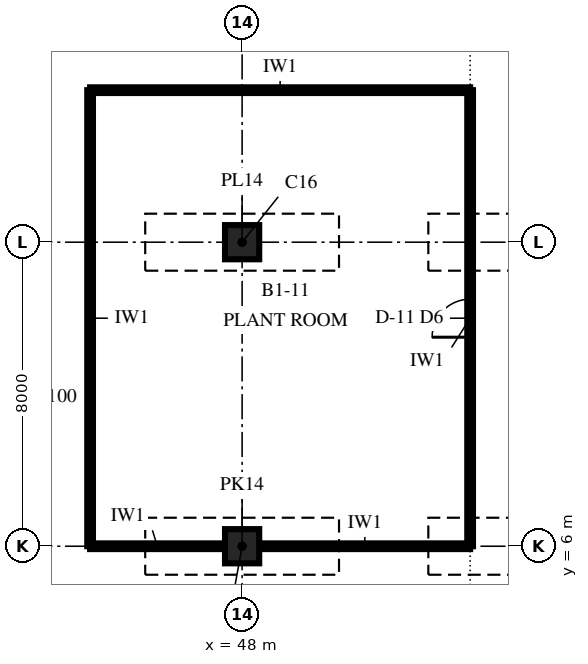
"""IFC4 building model, lengths in metres.
Left out: names, types, materials, properties, quantities, classifications, styles, units other than length and angle.
Written with IfcOpenShell. Run it as: python <this file> out.ifc"""

import sys

from ifc_helpers import new_model, si_unit, direction, frame, frame_2d, origin, origin_2d, place, context, subcontext, project, spatial, rectangle, extrude, element, fill, save


model = new_model("IFC4")
c1 = context("Model", 3, precision=1e-05, world=origin(), true_north=direction((0.0, 1.0)))
c2 = subcontext(c1, "Body", "Model", "MODEL_VIEW")
j1 = project(units=[si_unit("LENGTHUNIT", "METRE"), si_unit("PLANEANGLEUNIT", "RADIAN")], contexts=[c1])
p1 = place(None, origin())
s1 = spatial("IfcSite", under=j1, at=p1, CompositionType="ELEMENT")
p2 = place(p1, origin())
s2 = spatial("IfcBuilding", under=s1, at=p2, CompositionType="ELEMENT")
p3 = place(p2, frame((0.0, 0.0, -7.0)))
s3 = spatial("IfcBuildingStorey", under=s2, at=p3, CompositionType="ELEMENT", Elevation=-7.0)
for number, where, z_axis, x_axis in (
    (1, (48.0, 6.0, -0.6), (0.0, 0.0, 1.0), (1.0, 0.0, 0.0)),
    (2, (48.0, 14.0, -0.6), (0.0, 0.0, 1.0), (1.0, 0.0, 0.0)),
):
    element("IfcColumn", number, at=place(p3, frame(where, z_axis=z_axis, x_axis=x_axis)), inside=s3, PredefinedType="COLUMN", context=c2, shape_type="SweptSolid", body=[
        extrude(rectangle(XDim=0.9, YDim=0.9, at=origin_2d()), origin(), (0.0, 0.0, 1.0), 7.6),
    ])
p4 = place(p3, frame((44.0, 6.0, 0.0), z_axis=(0.0, 0.0, 1.0), x_axis=(0.0, 1.0, 0.0)))
e3 = element("IfcWall", 3, at=p4, inside=s3, PredefinedType="PARTITIONING", context=c2, shape_type="SweptSolid", body=[
    extrude(rectangle(XDim=12.0, YDim=0.15, at=frame_2d((6.0, 0.0))), origin(), (0.0, 0.0, 1.0), 6.7),
])
p5 = place(p3, frame((54.0, 6.0, 0.0), z_axis=(0.0, 0.0, 1.0), x_axis=(0.0, 1.0, 0.0)))
e4 = element("IfcWall", 4, at=p5, inside=s3, PredefinedType="PARTITIONING", context=c2, shape_type="SweptSolid", body=[
    extrude(rectangle(XDim=12.0, YDim=0.15, at=frame_2d((6.0, 0.0))), origin(), (0.0, 0.0, 1.0), 6.7),
])
p6 = place(p5, frame((5.5, 0.0, 0.0)))
e5 = element("IfcOpeningElement", 5, at=p6, cuts=e4, PredefinedType="OPENING", context=c2, shape_type="SweptSolid", body=[
    extrude(rectangle(XDim=1.0, YDim=2.1, at=frame_2d((0.5, 1.05))), frame((0.0, 0.09, 0.0), z_axis=(0.0, -1.0, 0.0), x_axis=(1.0, 0.0, 0.0)), (0.0, 0.0, 1.0), 0.18),
])
p7 = place(p3, frame((44.0, 6.0, 0.0), z_axis=(0.0, 0.0, 1.0), x_axis=(1.0, 0.0, 0.0)))
e6 = element("IfcWall", 6, at=p7, inside=s3, PredefinedType="PARTITIONING", context=c2, shape_type="SweptSolid", body=[
    extrude(rectangle(XDim=3.54, YDim=0.15, at=frame_2d((1.77, 0.0))), origin(), (0.0, 0.0, 1.0), 6.05),
])
p8 = place(p3, frame((48.46, 6.0, 0.0), z_axis=(0.0, 0.0, 1.0), x_axis=(1.0, 0.0, 0.0)))
e7 = element("IfcWall", 7, at=p8, inside=s3, PredefinedType="PARTITIONING", context=c2, shape_type="SweptSolid", body=[
    extrude(rectangle(XDim=5.54, YDim=0.15, at=frame_2d((2.77, 0.0))), origin(), (0.0, 0.0, 1.0), 6.05),
])
p9 = place(p3, frame((44.0, 18.0, 0.0), z_axis=(0.0, 0.0, 1.0), x_axis=(1.0, 0.0, 0.0)))
e8 = element("IfcWall", 8, at=p9, inside=s3, PredefinedType="PARTITIONING", context=c2, shape_type="SweptSolid", body=[
    extrude(rectangle(XDim=10.0, YDim=0.15, at=frame_2d((5.0, 0.0))), origin(), (0.0, 0.0, 1.0), 6.7),
])
p10 = place(p6, origin())
e9 = element("IfcDoor", 9, at=p10, inside=s3, OperationType="SINGLE_SWING_LEFT", PredefinedType="DOOR", context=c2, shape_type="SweptSolid", body=[
    extrude(rectangle(XDim=1.0, YDim=2.1, at=frame_2d((0.5, 1.05))), frame((0.0, 0.075, 0.0), z_axis=(0.0, -1.0, 0.0), x_axis=(1.0, 0.0, 0.0)), (0.0, 0.0, 1.0), 0.149),
])
fill(e5, e9)
save(model, sys.argv[1])
